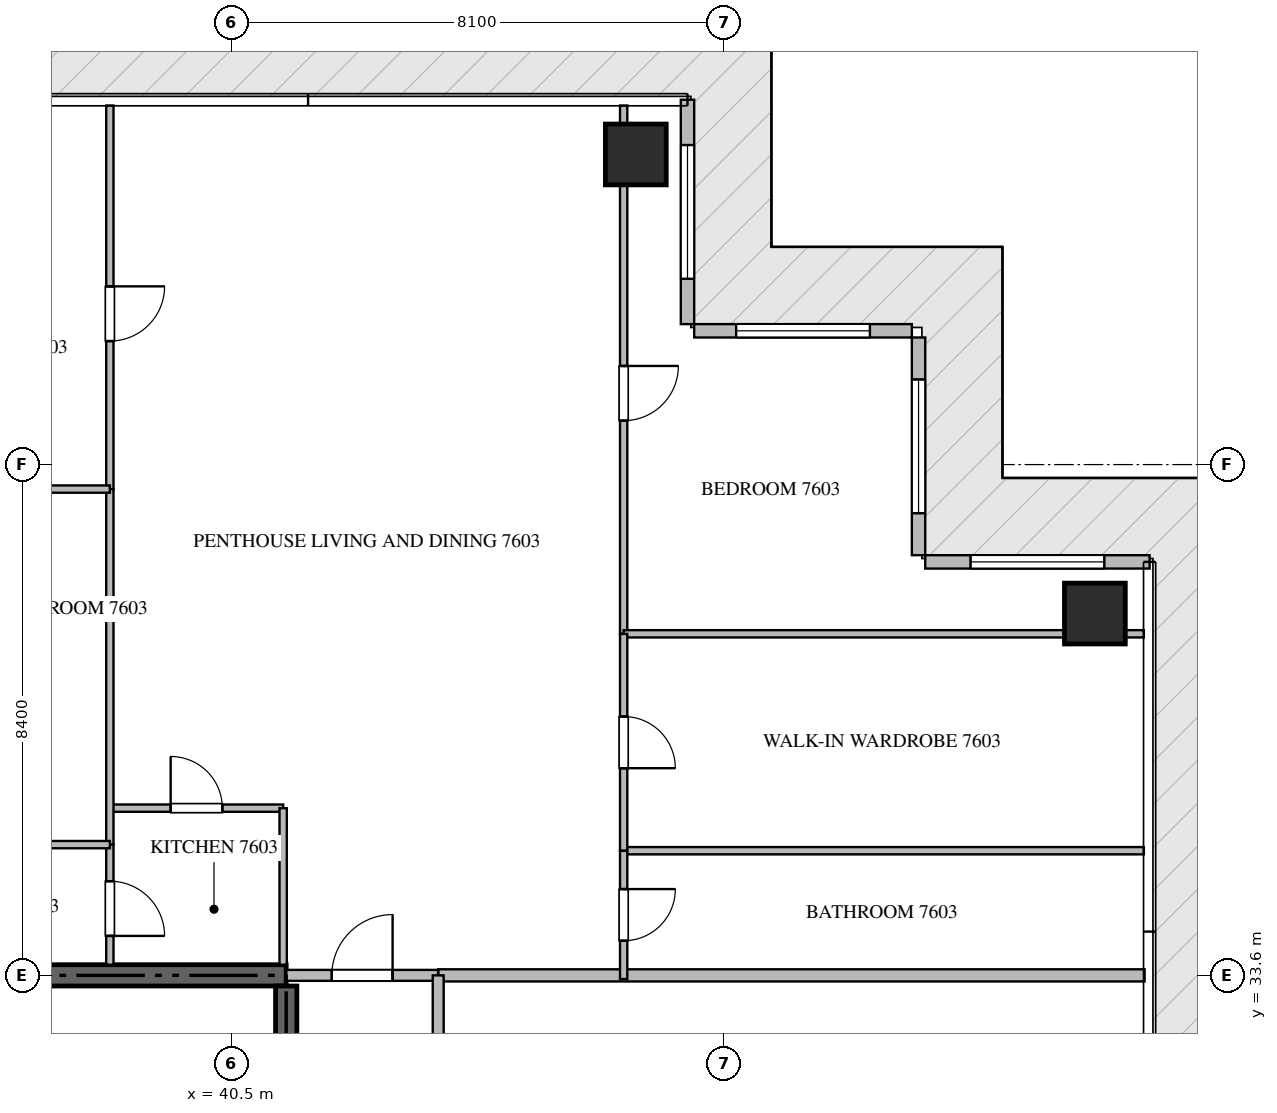
"""IFC4 building model, lengths in metres.
Left out: names, types, materials, properties, quantities, classifications, styles, units other than length and angle.
Written with IfcOpenShell. Run it as: python <this file> out.ifc"""

import sys

from ifc_helpers import new_model, si_unit, direction, frame, frame_2d, origin, origin_2d, place, context, subcontext, project, spatial, rectangle, extrude, source, transform, mapped, element, fill, save


model = new_model("IFC4")
c1 = context("Model", 3, precision=1e-05, world=origin(), true_north=direction((0.0, 1.0)))
c2 = subcontext(c1, "Body", "Model", "MODEL_VIEW")
j1 = project(units=[si_unit("LENGTHUNIT", "METRE"), si_unit("PLANEANGLEUNIT", "RADIAN")], contexts=[c1])
p1 = place(None, origin())
s1 = spatial("IfcSite", under=j1, at=p1, CompositionType="ELEMENT")
p2 = place(p1, origin())
s2 = spatial("IfcBuilding", under=s1, at=p2, CompositionType="ELEMENT")
p3 = place(p2, frame((0.0, 0.0, 305.6)))
s3 = spatial("IfcBuildingStorey", under=s2, at=p3, CompositionType="ELEMENT", Elevation=305.6)
p4 = place(p3, frame((41.4, 33.6, -0.26), z_axis=(0.0, 0.0, 1.0), x_axis=(-1.0, 0.0, 0.0)))
e1 = element("IfcWall", 1, at=p4, inside=s3, PredefinedType="SHEAR", context=c2, shape_type="SweptSolid", body=[
    extrude(rectangle(XDim=18.0, YDim=0.35, at=frame_2d((9.0, 0.0))), origin(), (0.0, 0.0, 1.0), 4.048),
])
p5 = place(p3, frame((41.4, 27.75, -0.26), z_axis=(0.0, 0.0, 1.0), x_axis=(0.0, 1.0, 0.0)))
e2 = element("IfcWall", 2, at=p5, inside=s3, PredefinedType="SHEAR", context=c2, shape_type="SweptSolid", body=[
    extrude(rectangle(XDim=5.675, YDim=0.35, at=frame_2d((2.837, 0.0))), origin(), (0.0, 0.0, 1.0), 4.048),
])
m1 = source(origin(), c2, "Body", "SweptSolid", [
    extrude(rectangle(XDim=1.0, YDim=1.0, at=origin_2d()), origin(), (0.0, 0.0, 1.0), 4.05),
])
for number, where, z_axis, x_axis in (
    (3, (47.15, 47.1, -0.26), (0.0, 0.0, 1.0), (1.0, 0.0, 0.0)),
    (4, (54.7, 39.55, -0.26), (0.0, 0.0, 1.0), (1.0, 0.0, 0.0)),
):
    element("IfcColumn", number, at=place(p3, frame(where, z_axis=z_axis, x_axis=x_axis)), inside=s3, PredefinedType="COLUMN", context=c2, shape_type="MappedRepresentation", body=[
        mapped(m1, transform((0.0, 0.0, 0.0), scale=1.0)),
    ])
p6 = place(p3, frame((55.6, 40.4, 0.0), z_axis=(0.0, 0.0, 1.0), x_axis=(-1.0, 0.0, 0.0)))
e5 = element("IfcWall", 5, at=p6, inside=s3, PredefinedType="ELEMENTEDWALL", context=c2, shape_type="SweptSolid", body=[
    extrude(rectangle(XDim=3.69, YDim=0.22, at=frame_2d((1.845, 0.0))), origin(), (0.0, 0.0, 1.0), 3.775),
])
p7 = place(p6, frame((0.745, 0.0, 0.65)))
e6 = element("IfcOpeningElement", 6, at=p7, cuts=e5, PredefinedType="OPENING", context=c2, shape_type="SweptSolid", body=[
    extrude(rectangle(XDim=2.2, YDim=2.4, at=frame_2d((1.1, 1.2))), frame((0.0, 0.12, 0.0), z_axis=(0.0, -1.0, 0.0), x_axis=(1.0, 0.0, 0.0)), (0.0, 0.0, 1.0), 0.24),
])
p8 = place(p3, frame((51.8, 40.51, 0.0), z_axis=(0.0, 0.0, 1.0), x_axis=(0.0, 1.0, 0.0)))
e7 = element("IfcWall", 7, at=p8, inside=s3, PredefinedType="ELEMENTEDWALL", context=c2, shape_type="SweptSolid", body=[
    extrude(rectangle(XDim=3.58, YDim=0.22, at=frame_2d((1.79, 0.0))), origin(), (0.0, 0.0, 1.0), 3.775),
])
p9 = place(p8, frame((0.69, 0.0, 0.65)))
e8 = element("IfcOpeningElement", 8, at=p9, cuts=e7, PredefinedType="OPENING", context=c2, shape_type="SweptSolid", body=[
    extrude(rectangle(XDim=2.2, YDim=2.4, at=frame_2d((1.1, 1.2))), frame((0.0, 0.12, 0.0), z_axis=(0.0, -1.0, 0.0), x_axis=(1.0, 0.0, 0.0)), (0.0, 0.0, 1.0), 0.24),
])
p10 = place(p3, frame((51.69, 44.2, 0.0), z_axis=(0.0, 0.0, 1.0), x_axis=(-1.0, 0.0, 0.0)))
e9 = element("IfcWall", 9, at=p10, inside=s3, PredefinedType="ELEMENTEDWALL", context=c2, shape_type="SweptSolid", body=[
    extrude(rectangle(XDim=3.58, YDim=0.22, at=frame_2d((1.79, 0.0))), origin(), (0.0, 0.0, 1.0), 3.775),
])
p11 = place(p10, frame((0.69, 0.0, 0.65)))
e10 = element("IfcOpeningElement", 10, at=p11, cuts=e9, PredefinedType="OPENING", context=c2, shape_type="SweptSolid", body=[
    extrude(rectangle(XDim=2.2, YDim=2.4, at=frame_2d((1.1, 1.2))), frame((0.0, 0.12, 0.0), z_axis=(0.0, -1.0, 0.0), x_axis=(1.0, 0.0, 0.0)), (0.0, 0.0, 1.0), 0.24),
])
p12 = place(p3, frame((48.0, 44.31, 0.0), z_axis=(0.0, 0.0, 1.0), x_axis=(0.0, 1.0, 0.0)))
e11 = element("IfcWall", 11, at=p12, inside=s3, PredefinedType="ELEMENTEDWALL", context=c2, shape_type="SweptSolid", body=[
    extrude(rectangle(XDim=3.69, YDim=0.22, at=frame_2d((1.845, 0.0))), origin(), (0.0, 0.0, 1.0), 3.775),
])
p13 = place(p12, frame((0.745, 0.0, 0.65)))
e12 = element("IfcOpeningElement", 12, at=p13, cuts=e11, PredefinedType="OPENING", context=c2, shape_type="SweptSolid", body=[
    extrude(rectangle(XDim=2.2, YDim=2.4, at=frame_2d((1.1, 1.2))), frame((0.0, 0.12, 0.0), z_axis=(0.0, -1.0, 0.0), x_axis=(1.0, 0.0, 0.0)), (0.0, 0.0, 1.0), 0.24),
])
p14 = place(p3, frame((43.9, 33.6, 0.0), z_axis=(0.0, 0.0, 1.0), x_axis=(1.0, 0.0, 0.0)))
e13 = element("IfcWall", 13, at=p14, inside=s3, PredefinedType="PARTITIONING", context=c2, shape_type="SweptSolid", body=[
    extrude(rectangle(XDim=11.618, YDim=0.2, at=frame_2d((5.809, 0.0))), origin(), (0.0, 0.0, 1.0), 3.79),
])
p15 = place(p3, frame((41.402, 33.6, 0.0), z_axis=(0.0, 0.0, 1.0), x_axis=(1.0, 0.0, 0.0)))
e14 = element("IfcWall", 14, at=p15, inside=s3, PredefinedType="PARTITIONING", context=c2, shape_type="SweptSolid", body=[
    extrude(rectangle(XDim=2.496, YDim=0.18, at=frame_2d((1.248, 0.0))), origin(), (0.0, 0.0, 1.0), 3.79),
])
p16 = place(p15, frame((0.748, 0.0, 0.0)))
e15 = element("IfcOpeningElement", 15, at=p16, cuts=e14, PredefinedType="OPENING", context=c2, shape_type="SweptSolid", body=[
    extrude(rectangle(XDim=1.0, YDim=2.15, at=frame_2d((0.5, 1.075))), frame((0.0, 0.1, 0.0), z_axis=(0.0, -1.0, 0.0), x_axis=(1.0, 0.0, 0.0)), (0.0, 0.0, 1.0), 0.2),
])
p17 = place(p3, frame((43.9, 16.8, 0.0), z_axis=(0.0, 0.0, 1.0), x_axis=(0.0, 1.0, 0.0)))
e16 = element("IfcWall", 16, at=p17, inside=s3, PredefinedType="PARTITIONING", context=c2, shape_type="SweptSolid", body=[
    extrude(rectangle(XDim=16.8, YDim=0.18, at=frame_2d((8.4, 0.0))), origin(), (0.0, 0.0, 1.0), 3.79),
])
p18 = place(p17, frame((14.5, 0.0, 0.0)))
e17 = element("IfcOpeningElement", 17, at=p18, cuts=e16, PredefinedType="OPENING", context=c2, shape_type="SweptSolid", body=[
    extrude(rectangle(XDim=1.0, YDim=2.15, at=frame_2d((0.5, 1.075))), frame((0.0, 0.1, 0.0), z_axis=(0.0, -1.0, 0.0), x_axis=(1.0, 0.0, 0.0)), (0.0, 0.0, 1.0), 0.2),
])
p19 = place(p3, frame((38.5, 36.35, 0.0), z_axis=(0.0, 0.0, 1.0), x_axis=(1.0, 0.0, 0.0)))
e18 = element("IfcWall", 18, at=p19, inside=s3, PredefinedType="PARTITIONING", context=c2, shape_type="SweptSolid", body=[
    extrude(rectangle(XDim=2.85, YDim=0.12, at=frame_2d((1.425, 0.0))), origin(), (0.0, 0.0, 1.0), 3.79),
])
p20 = place(p19, frame((1.0, 0.0, 0.0)))
e19 = element("IfcOpeningElement", 19, at=p20, cuts=e18, PredefinedType="OPENING", context=c2, shape_type="SweptSolid", body=[
    extrude(rectangle(XDim=0.85, YDim=2.1, at=frame_2d((0.425, 1.05))), frame((0.0, 0.07, 0.0), z_axis=(0.0, -1.0, 0.0), x_axis=(1.0, 0.0, 0.0)), (0.0, 0.0, 1.0), 0.14),
])
p21 = place(p3, frame((41.35, 36.35, 0.0), z_axis=(0.0, 0.0, 1.0), x_axis=(0.0, -1.0, 0.0)))
e20 = element("IfcWall", 20, at=p21, inside=s3, PredefinedType="PARTITIONING", context=c2, shape_type="SweptSolid", body=[
    extrude(rectangle(XDim=2.575, YDim=0.12, at=frame_2d((1.288, 0.0))), origin(), (0.0, 0.0, 1.0), 3.79),
])
p22 = place(p3, frame((38.5, 35.75, 0.0), z_axis=(0.0, 0.0, 1.0), x_axis=(0.0, -1.0, 0.0)))
e21 = element("IfcWall", 21, at=p22, inside=s3, PredefinedType="PARTITIONING", context=c2, shape_type="SweptSolid", body=[
    extrude(rectangle(XDim=1.975, YDim=0.12, at=frame_2d((0.988, 0.0))), origin(), (0.0, 0.0, 1.0), 3.79),
])
p23 = place(p22, frame((0.601, 0.0, 0.0)))
e22 = element("IfcOpeningElement", 22, at=p23, cuts=e21, PredefinedType="OPENING", context=c2, shape_type="SweptSolid", body=[
    extrude(rectangle(XDim=0.9, YDim=2.1, at=frame_2d((0.45, 1.05))), frame((0.0, 0.07, 0.0), z_axis=(0.0, -1.0, 0.0), x_axis=(1.0, 0.0, 0.0)), (0.0, 0.0, 1.0), 0.14),
])
p24 = place(p3, frame((38.5, 47.905, 0.0), z_axis=(0.0, 0.0, 1.0), x_axis=(0.0, -1.0, 0.0)))
e23 = element("IfcWall", 23, at=p24, inside=s3, PredefinedType="PARTITIONING", context=c2, shape_type="SweptSolid", body=[
    extrude(rectangle(XDim=6.308, YDim=0.12, at=frame_2d((3.154, 0.0))), origin(), (0.0, 0.0, 1.0), 3.79),
])
p25 = place(p24, frame((2.974, 0.0, 0.0)))
e24 = element("IfcOpeningElement", 24, at=p25, cuts=e23, PredefinedType="OPENING", context=c2, shape_type="SweptSolid", body=[
    extrude(rectangle(XDim=0.9, YDim=2.1, at=frame_2d((0.45, 1.05))), frame((0.0, 0.07, 0.0), z_axis=(0.0, -1.0, 0.0), x_axis=(1.0, 0.0, 0.0)), (0.0, 0.0, 1.0), 0.14),
])
p26 = place(p3, frame((38.5, 41.595, 0.0), z_axis=(0.0, 0.0, 1.0), x_axis=(0.0, -1.0, 0.0)))
e25 = element("IfcWall", 25, at=p26, inside=s3, PredefinedType="PARTITIONING", context=c2, shape_type="SweptSolid", body=[
    extrude(rectangle(XDim=5.843, YDim=0.12, at=frame_2d((2.921, 0.0))), origin(), (0.0, 0.0, 1.0), 3.79),
])
p27 = place(p3, frame((33.38, 41.597, 0.0), z_axis=(0.0, 0.0, 1.0), x_axis=(1.0, 0.0, 0.0)))
e26 = element("IfcWall", 26, at=p27, inside=s3, PredefinedType="PARTITIONING", context=c2, shape_type="SweptSolid", body=[
    extrude(rectangle(XDim=5.12, YDim=0.12, at=frame_2d((2.56, 0.0))), origin(), (0.0, 0.0, 1.0), 3.79),
])
p28 = place(p3, frame((35.482, 35.75, 0.0), z_axis=(0.0, 0.0, 1.0), x_axis=(1.0, 0.0, 0.0)))
e27 = element("IfcWall", 27, at=p28, inside=s3, PredefinedType="PARTITIONING", context=c2, shape_type="SweptSolid", body=[
    extrude(rectangle(XDim=3.018, YDim=0.12, at=frame_2d((1.509, 0.0))), origin(), (0.0, 0.0, 1.0), 3.79),
])
p29 = place(p28, frame((1.084, 0.0, 0.0)))
e28 = element("IfcOpeningElement", 28, at=p29, cuts=e27, PredefinedType="OPENING", context=c2, shape_type="SweptSolid", body=[
    extrude(rectangle(XDim=0.85, YDim=2.1, at=frame_2d((0.425, 1.05))), frame((0.0, 0.07, 0.0), z_axis=(0.0, -1.0, 0.0), x_axis=(1.0, 0.0, 0.0)), (0.0, 0.0, 1.0), 0.14),
])
p30 = place(p3, frame((46.95, 47.905, 0.0), z_axis=(0.0, 0.0, 1.0), x_axis=(0.0, -1.0, 0.0)))
e29 = element("IfcWall", 29, at=p30, inside=s3, PredefinedType="PARTITIONING", context=c2, shape_type="SweptSolid", body=[
    extrude(rectangle(XDim=8.688, YDim=0.12, at=frame_2d((4.344, 0.0))), origin(), (0.0, 0.0, 1.0), 3.292),
])
p31 = place(p30, frame((4.283, 0.0, 0.0)))
e30 = element("IfcOpeningElement", 30, at=p31, cuts=e29, PredefinedType="OPENING", context=c2, shape_type="SweptSolid", body=[
    extrude(rectangle(XDim=0.9, YDim=2.1, at=frame_2d((0.45, 1.05))), frame((0.0, 0.07, 0.0), z_axis=(0.0, -1.0, 0.0), x_axis=(1.0, 0.0, 0.0)), (0.0, 0.0, 1.0), 0.14),
])
for number, where, z_axis, x_axis in (
    (31, (46.95, 39.217, 0.0), (0.0, 0.0, 1.0), (1.0, 0.0, 0.0)),
    (32, (46.95, 35.65, 0.0), (0.0, 0.0, 1.0), (1.0, 0.0, 0.0)),
):
    element("IfcWall", number, at=place(p3, frame(where, z_axis=z_axis, x_axis=x_axis)), inside=s3, PredefinedType="PARTITIONING", context=c2, shape_type="SweptSolid", body=[
        extrude(rectangle(XDim=8.555, YDim=0.12, at=frame_2d((4.277, 0.0))), origin(), (0.0, 0.0, 1.0), 3.79),
    ])
p32 = place(p3, frame((46.95, 39.215, 0.0), z_axis=(0.0, 0.0, 1.0), x_axis=(0.0, -1.0, 0.0)))
e33 = element("IfcWall", 33, at=p32, inside=s3, PredefinedType="PARTITIONING", context=c2, shape_type="SweptSolid", body=[
    extrude(rectangle(XDim=3.565, YDim=0.12, at=frame_2d((1.783, 0.0))), origin(), (0.0, 0.0, 1.0), 3.372),
])
p33 = place(p32, frame((1.358, 0.0, 0.0)))
e34 = element("IfcOpeningElement", 34, at=p33, cuts=e33, PredefinedType="OPENING", context=c2, shape_type="SweptSolid", body=[
    extrude(rectangle(XDim=0.85, YDim=2.1, at=frame_2d((0.425, 1.05))), frame((0.0, 0.07, 0.0), z_axis=(0.0, -1.0, 0.0), x_axis=(1.0, 0.0, 0.0)), (0.0, 0.0, 1.0), 0.14),
])
p34 = place(p3, frame((46.95, 35.648, 0.0), z_axis=(0.0, 0.0, 1.0), x_axis=(0.0, -1.0, 0.0)))
e35 = element("IfcWall", 35, at=p34, inside=s3, PredefinedType="PARTITIONING", context=c2, shape_type="SweptSolid", body=[
    extrude(rectangle(XDim=2.108, YDim=0.12, at=frame_2d((1.054, 0.0))), origin(), (0.0, 0.0, 1.0), 3.372),
])
p35 = place(p34, frame((0.629, 0.0, 0.0)))
e36 = element("IfcOpeningElement", 36, at=p35, cuts=e35, PredefinedType="OPENING", context=c2, shape_type="SweptSolid", body=[
    extrude(rectangle(XDim=0.85, YDim=2.1, at=frame_2d((0.425, 1.05))), frame((0.0, 0.07, 0.0), z_axis=(0.0, -1.0, 0.0), x_axis=(1.0, 0.0, 0.0)), (0.0, 0.0, 1.0), 0.14),
])
m2 = source(origin(), c2, "Body", "SweptSolid", [
    extrude(rectangle(XDim=2.2, YDim=2.4, at=frame_2d((1.1, 1.2))), frame((0.0, 0.03, 0.0), z_axis=(0.0, -1.0, 0.0), x_axis=(1.0, 0.0, 0.0)), (0.0, 0.0, 1.0), 0.06),
])
p36 = place(p7, origin())
e37 = element("IfcWindow", 37, at=p36, inside=s3, PartitioningType="SINGLE_PANEL", PredefinedType="WINDOW", context=c2, shape_type="MappedRepresentation", body=[
    mapped(m2, transform((0.0, 0.0, 0.0), scale=1.0)),
])
fill(e6, e37)
p37 = place(p9, origin())
e38 = element("IfcWindow", 38, at=p37, inside=s3, PartitioningType="SINGLE_PANEL", PredefinedType="WINDOW", context=c2, shape_type="MappedRepresentation", body=[
    mapped(m2, transform((0.0, 0.0, 0.0), scale=1.0)),
])
fill(e8, e38)
p38 = place(p11, origin())
e39 = element("IfcWindow", 39, at=p38, inside=s3, PartitioningType="SINGLE_PANEL", PredefinedType="WINDOW", context=c2, shape_type="MappedRepresentation", body=[
    mapped(m2, transform((0.0, 0.0, 0.0), scale=1.0)),
])
fill(e10, e39)
p39 = place(p13, origin())
e40 = element("IfcWindow", 40, at=p39, inside=s3, PartitioningType="SINGLE_PANEL", PredefinedType="WINDOW", context=c2, shape_type="MappedRepresentation", body=[
    mapped(m2, transform((0.0, 0.0, 0.0), scale=1.0)),
])
fill(e12, e40)
m3 = source(origin(), c2, "Body", "SweptSolid", [
    extrude(rectangle(XDim=1.0, YDim=2.15, at=frame_2d((0.5, 1.075))), frame((0.0, 0.025, 0.0), z_axis=(0.0, -1.0, 0.0), x_axis=(1.0, 0.0, 0.0)), (0.0, 0.0, 1.0), 0.05),
])
p40 = place(p16, origin())
e41 = element("IfcDoor", 41, at=p40, inside=s3, OperationType="SINGLE_SWING_RIGHT", PredefinedType="DOOR", context=c2, shape_type="MappedRepresentation", body=[
    mapped(m3, transform((0.0, 0.0, 0.0), scale=1.0)),
])
fill(e15, e41)
m4 = source(origin(), c2, "Body", "SweptSolid", [
    extrude(rectangle(XDim=0.85, YDim=2.1, at=frame_2d((0.425, 1.05))), frame((0.0, 0.025, 0.0), z_axis=(0.0, -1.0, 0.0), x_axis=(1.0, 0.0, 0.0)), (0.0, 0.0, 1.0), 0.05),
])
p41 = place(p20, origin())
e42 = element("IfcDoor", 42, at=p41, inside=s3, OperationType="SINGLE_SWING_LEFT", PredefinedType="DOOR", context=c2, shape_type="MappedRepresentation", body=[
    mapped(m4, transform((0.0, 0.0, 0.0), scale=1.0)),
])
fill(e19, e42)
m5 = source(origin(), c2, "Body", "SweptSolid", [
    extrude(rectangle(XDim=0.9, YDim=2.1, at=frame_2d((0.45, 1.05))), frame((0.0, 0.025, 0.0), z_axis=(0.0, -1.0, 0.0), x_axis=(1.0, 0.0, 0.0)), (0.0, 0.0, 1.0), 0.05),
])
p42 = place(p23, origin())
e43 = element("IfcDoor", 43, at=p42, inside=s3, OperationType="SINGLE_SWING_RIGHT", PredefinedType="DOOR", context=c2, shape_type="MappedRepresentation", body=[
    mapped(m5, transform((0.0, 0.0, 0.0), scale=1.0)),
])
fill(e22, e43)
p43 = place(p25, origin())
e44 = element("IfcDoor", 44, at=p43, inside=s3, OperationType="SINGLE_SWING_LEFT", PredefinedType="DOOR", context=c2, shape_type="MappedRepresentation", body=[
    mapped(m5, transform((0.0, 0.0, 0.0), scale=1.0)),
])
fill(e24, e44)
p44 = place(p31, origin())
e45 = element("IfcDoor", 45, at=p44, inside=s3, OperationType="SINGLE_SWING_LEFT", PredefinedType="DOOR", context=c2, shape_type="MappedRepresentation", body=[
    mapped(m5, transform((0.0, 0.0, 0.0), scale=1.0)),
])
fill(e30, e45)
p45 = place(p33, origin())
e46 = element("IfcDoor", 46, at=p45, inside=s3, OperationType="SINGLE_SWING_RIGHT", PredefinedType="DOOR", context=c2, shape_type="MappedRepresentation", body=[
    mapped(m4, transform((0.0, 0.0, 0.0), scale=1.0)),
])
fill(e34, e46)
p46 = place(p35, origin())
e47 = element("IfcDoor", 47, at=p46, inside=s3, OperationType="SINGLE_SWING_LEFT", PredefinedType="DOOR", context=c2, shape_type="MappedRepresentation", body=[
    mapped(m4, transform((0.0, 0.0, 0.0), scale=1.0)),
])
fill(e36, e47)
save(model, sys.argv[1])
